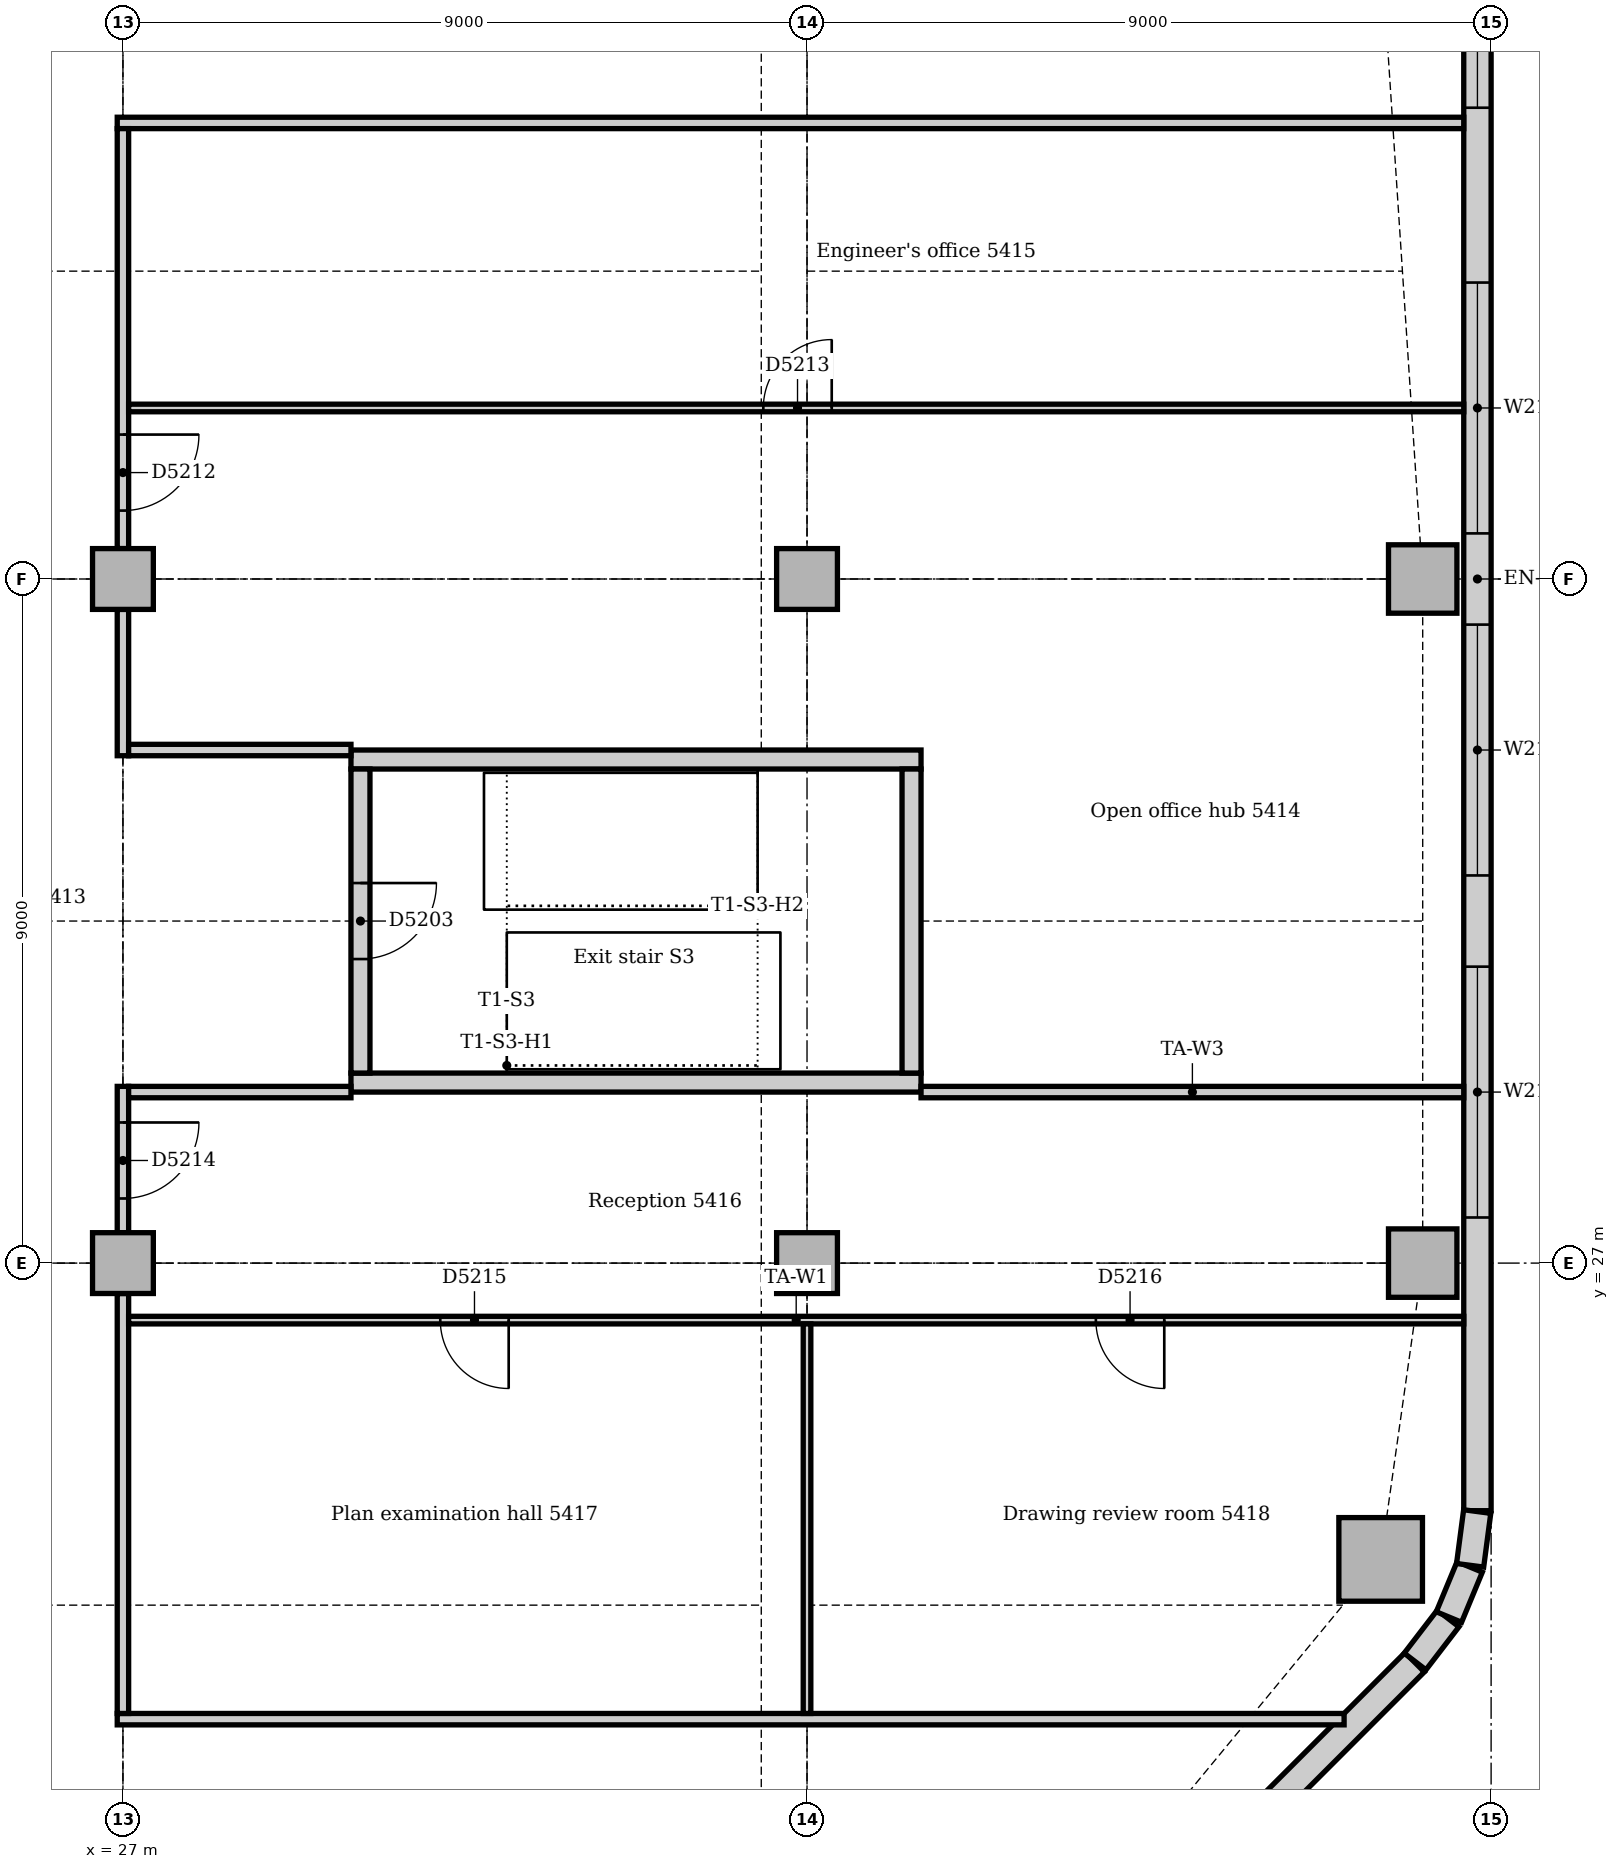
"""IFC4 building model, lengths in metres.
Left out: names, types, materials, properties, quantities, classifications, styles, units other than length and angle.
Written with IfcOpenShell. Run it as: python <this file> out.ifc"""

import sys

from ifc_helpers import new_model, si_unit, direction, frame, frame_2d, origin, origin_2d, place, context, subcontext, project, spatial, rectangle, extrude, element, fill, save


model = new_model("IFC4")
c1 = context("Model", 3, precision=1e-05, world=origin(), true_north=direction((0.0, 1.0)))
c2 = subcontext(c1, "Body", "Model", "MODEL_VIEW")
j1 = project(units=[si_unit("LENGTHUNIT", "METRE"), si_unit("PLANEANGLEUNIT", "RADIAN")], contexts=[c1])
p1 = place(None, origin())
s1 = spatial("IfcSite", under=j1, at=p1, CompositionType="ELEMENT")
p2 = place(p1, origin())
s2 = spatial("IfcBuilding", under=s1, at=p2, CompositionType="ELEMENT")
p3 = place(p2, frame((0.0, 0.0, 226.0)))
s3 = spatial("IfcBuildingStorey", under=s2, at=p3, CompositionType="ELEMENT", Elevation=226.0)
for number, where, z_axis, x_axis in (
    (1, (30.0, 29.375, 0.0), (0.0, 0.0, 1.0), (1.0, 0.0, 0.0)),
    (2, (37.5, 33.625, 0.0), (0.0, 0.0, 1.0), (-1.0, 0.0, 0.0)),
):
    element("IfcWall", number, at=place(p3, frame(where, z_axis=z_axis, x_axis=x_axis)), inside=s3, PredefinedType="SOLIDWALL", context=c2, shape_type="SweptSolid", body=[
        extrude(rectangle(XDim=7.5, YDim=0.25, at=frame_2d((3.75, 0.0))), origin(), (0.0, 0.0, 1.0), 4.0),
    ])
p4 = place(p3, frame((37.375, 29.5, 0.0), z_axis=(0.0, 0.0, 1.0), x_axis=(0.0, 1.0, 0.0)))
e3 = element("IfcWall", 3, at=p4, inside=s3, PredefinedType="SOLIDWALL", context=c2, shape_type="SweptSolid", body=[
    extrude(rectangle(XDim=4.0, YDim=0.25, at=frame_2d((2.0, 0.0))), origin(), (0.0, 0.0, 1.0), 4.0),
])
p5 = place(p3, frame((30.125, 33.5, 0.0), z_axis=(0.0, 0.0, 1.0), x_axis=(0.0, -1.0, 0.0)))
e4 = element("IfcWall", 4, at=p5, inside=s3, PredefinedType="SOLIDWALL", context=c2, shape_type="SweptSolid", body=[
    extrude(rectangle(XDim=4.0, YDim=0.25, at=frame_2d((2.0, 0.0))), origin(), (0.0, 0.0, 1.0), 4.0),
])
p6 = place(p5, frame((1.5, 0.0, 0.0)))
e5 = element("IfcOpeningElement", 5, at=p6, cuts=e4, PredefinedType="OPENING", context=c2, shape_type="SweptSolid", body=[
    extrude(rectangle(XDim=1.0, YDim=2.1, at=frame_2d((0.5, 1.05))), frame((0.0, 0.135, 0.0), z_axis=(0.0, -1.0, 0.0), x_axis=(1.0, 0.0, 0.0)), (0.0, 0.0, 1.0), 0.27),
])
p7 = place(p3, frame((43.547, 23.102, 0.0), z_axis=(0.0, 0.0, 1.0), x_axis=(1.0, 0.0, 0.0)))
e6 = element("IfcColumn", 6, at=p7, inside=s3, PredefinedType="COLUMN", context=c2, shape_type="SweptSolid", body=[
    extrude(rectangle(XDim=1.1, YDim=1.1, at=origin_2d()), origin(), (0.0, 0.0, 1.0), 3.85),
])
for number, where, z_axis, x_axis in (
    (7, (44.1, 27.0, 0.0), (0.0, 0.0, 1.0), (1.0, 0.0, 0.0)),
    (8, (44.1, 36.0, 0.0), (0.0, 0.0, 1.0), (1.0, 0.0, 0.0)),
):
    element("IfcColumn", number, at=place(p3, frame(where, z_axis=z_axis, x_axis=x_axis)), inside=s3, PredefinedType="COLUMN", context=c2, shape_type="SweptSolid", body=[
        extrude(rectangle(XDim=0.9, YDim=0.9, at=origin_2d()), origin(), (0.0, 0.0, 1.0), 3.85),
    ])
for number, where, z_axis, x_axis in (
    (9, (27.0, 27.0, 0.0), (0.0, 0.0, 1.0), (1.0, 0.0, 0.0)),
    (10, (27.0, 36.0, 0.0), (0.0, 0.0, 1.0), (1.0, 0.0, 0.0)),
    (11, (36.0, 27.0, 0.0), (0.0, 0.0, 1.0), (1.0, 0.0, 0.0)),
    (12, (36.0, 36.0, 0.0), (0.0, 0.0, 1.0), (1.0, 0.0, 0.0)),
):
    element("IfcColumn", number, at=place(p3, frame(where, z_axis=z_axis, x_axis=x_axis)), inside=s3, PredefinedType="COLUMN", context=c2, shape_type="SweptSolid", body=[
        extrude(rectangle(XDim=0.8, YDim=0.8, at=origin_2d()), origin(), (0.0, 0.0, 1.0), 3.85),
    ])
p8 = place(p3, frame((36.751, 14.506, 0.0), z_axis=(0.0, 0.0, 1.0), x_axis=(0.707106781187, 0.707106781187, 0.0)))
e13 = element("IfcWall", 13, at=p8, inside=s3, PredefinedType="STANDARD", context=c2, shape_type="SweptSolid", body=[
    extrude(rectangle(XDim=10.243, YDim=0.36, at=frame_2d((5.121, 0.0))), origin(), (0.0, 0.0, 1.0), 3.85),
])
p9 = place(p8, frame((5.021, 0.0, 0.9)))
e14 = element("IfcOpeningElement", 14, at=p9, cuts=e13, PredefinedType="OPENING", context=c2, shape_type="SweptSolid", body=[
    extrude(rectangle(XDim=1.8, YDim=1.6, at=frame_2d((0.9, 0.8))), frame((0.0, 0.19, 0.0), z_axis=(0.0, -1.0, 0.0), x_axis=(1.0, 0.0, 0.0)), (0.0, 0.0, 1.0), 0.38),
])
p10 = place(p3, frame((44.82, 23.743, 0.0), z_axis=(0.0, 0.0, 1.0), x_axis=(0.0, 1.0, 0.0)))
e15 = element("IfcWall", 15, at=p10, inside=s3, PredefinedType="STANDARD", context=c2, shape_type="SweptSolid", body=[
    extrude(rectangle(XDim=24.515, YDim=0.36, at=frame_2d((12.257, 0.0))), origin(), (0.0, 0.0, 1.0), 3.85),
])
p11 = place(p10, frame((3.857, 0.0, 0.9)))
e16 = element("IfcOpeningElement", 16, at=p11, cuts=e15, PredefinedType="OPENING", context=c2, shape_type="SweptSolid", body=[
    extrude(rectangle(XDim=3.3, YDim=1.6, at=frame_2d((1.65, 0.8))), frame((0.0, 0.19, 0.0), z_axis=(0.0, -1.0, 0.0), x_axis=(1.0, 0.0, 0.0)), (0.0, 0.0, 1.0), 0.38),
])
p12 = place(p10, frame((8.357, 0.0, 0.9)))
e17 = element("IfcOpeningElement", 17, at=p12, cuts=e15, PredefinedType="OPENING", context=c2, shape_type="SweptSolid", body=[
    extrude(rectangle(XDim=3.3, YDim=1.6, at=frame_2d((1.65, 0.8))), frame((0.0, 0.19, 0.0), z_axis=(0.0, -1.0, 0.0), x_axis=(1.0, 0.0, 0.0)), (0.0, 0.0, 1.0), 0.38),
])
p13 = place(p10, frame((12.857, 0.0, 0.9)))
e18 = element("IfcOpeningElement", 18, at=p13, cuts=e15, PredefinedType="OPENING", context=c2, shape_type="SweptSolid", body=[
    extrude(rectangle(XDim=3.3, YDim=1.6, at=frame_2d((1.65, 0.8))), frame((0.0, 0.19, 0.0), z_axis=(0.0, -1.0, 0.0), x_axis=(1.0, 0.0, 0.0)), (0.0, 0.0, 1.0), 0.38),
])
p14 = place(p10, frame((18.457, 0.0, 0.9)))
e19 = element("IfcOpeningElement", 19, at=p14, cuts=e15, PredefinedType="OPENING", context=c2, shape_type="SweptSolid", body=[
    extrude(rectangle(XDim=1.8, YDim=1.6, at=frame_2d((0.9, 0.8))), frame((0.0, 0.19, 0.0), z_axis=(0.0, -1.0, 0.0), x_axis=(1.0, 0.0, 0.0)), (0.0, 0.0, 1.0), 0.38),
])
p15 = place(p3, frame((44.0, 21.759, 0.0), z_axis=(0.0, 0.0, 1.0), x_axis=(0.608802368033, 0.793321924995, 0.0)))
e20 = element("IfcWall", 20, at=p15, inside=s3, PredefinedType="STANDARD", context=c2, shape_type="SweptSolid", body=[
    extrude(rectangle(XDim=0.713, YDim=0.36, at=frame_2d((0.357, 0.0))), origin(), (0.0, 0.0, 1.0), 3.85),
])
for number, where, z_axis, x_axis in (
    (21, (44.445, 22.344, 0.0), (0.0, 0.0, 1.0), (0.383, 0.924, 0.0)),
    (22, (44.724, 23.024, 0.0), (0.0, 0.0, 1.0), (0.131, 0.991, 0.0)),
):
    element("IfcWall", number, at=place(p3, frame(where, z_axis=z_axis, x_axis=x_axis)), inside=s3, PredefinedType="STANDARD", context=c2, shape_type="SweptSolid", body=[
        extrude(rectangle(XDim=0.713, YDim=0.36, at=frame_2d((0.356, 0.0))), origin(), (0.0, 0.0, 1.0), 3.85),
    ])
p16 = place(p3, frame((26.925, 42.0, 0.0), z_axis=(0.0, 0.0, 1.0), x_axis=(1.0, 0.0, 0.0)))
e23 = element("IfcWall", 23, at=p16, inside=s3, PredefinedType="PARTITIONING", context=c2, shape_type="SweptSolid", body=[
    extrude(rectangle(XDim=17.715, YDim=0.15, at=frame_2d((8.857, 0.0))), origin(), (0.0, 0.0, 1.0), 3.85),
])
p17 = place(p3, frame((26.925, 21.0, 0.0), z_axis=(0.0, 0.0, 1.0), x_axis=(1.0, 0.0, 0.0)))
e24 = element("IfcWall", 24, at=p17, inside=s3, PredefinedType="PARTITIONING", context=c2, shape_type="SweptSolid", body=[
    extrude(rectangle(XDim=16.141, YDim=0.15, at=frame_2d((8.07, 0.0))), origin(), (0.0, 0.0, 1.0), 3.85),
])
p18 = place(p3, frame((27.0, 21.075, 0.0), z_axis=(0.0, 0.0, 1.0), x_axis=(0.0, 1.0, 0.0)))
e25 = element("IfcWall", 25, at=p18, inside=s3, PredefinedType="PARTITIONING", context=c2, shape_type="SweptSolid", body=[
    extrude(rectangle(XDim=5.525, YDim=0.15, at=frame_2d((2.763, 0.0))), origin(), (0.0, 0.0, 1.0), 3.35),
])
p19 = place(p3, frame((27.0, 27.4, 0.0), z_axis=(0.0, 0.0, 1.0), x_axis=(0.0, 1.0, 0.0)))
e26 = element("IfcWall", 26, at=p19, inside=s3, PredefinedType="PARTITIONING", context=c2, shape_type="SweptSolid", body=[
    extrude(rectangle(XDim=1.925, YDim=0.15, at=frame_2d((0.963, 0.0))), origin(), (0.0, 0.0, 1.0), 3.35),
])
p20 = place(p19, frame((0.45, 0.0, 0.0)))
e27 = element("IfcOpeningElement", 27, at=p20, cuts=e26, PredefinedType="OPENING", context=c2, shape_type="SweptSolid", body=[
    extrude(rectangle(XDim=1.0, YDim=2.1, at=frame_2d((0.5, 1.05))), frame((0.0, 0.085, 0.0), z_axis=(0.0, -1.0, 0.0), x_axis=(1.0, 0.0, 0.0)), (0.0, 0.0, 1.0), 0.17),
])
p21 = place(p3, frame((27.0, 33.675, 0.0), z_axis=(0.0, 0.0, 1.0), x_axis=(0.0, 1.0, 0.0)))
e28 = element("IfcWall", 28, at=p21, inside=s3, PredefinedType="PARTITIONING", context=c2, shape_type="SweptSolid", body=[
    extrude(rectangle(XDim=1.925, YDim=0.15, at=frame_2d((0.963, 0.0))), origin(), (0.0, 0.0, 1.0), 3.35),
])
p22 = place(p3, frame((27.0, 36.4, 0.0), z_axis=(0.0, 0.0, 1.0), x_axis=(0.0, 1.0, 0.0)))
e29 = element("IfcWall", 29, at=p22, inside=s3, PredefinedType="PARTITIONING", context=c2, shape_type="SweptSolid", body=[
    extrude(rectangle(XDim=5.525, YDim=0.15, at=frame_2d((2.763, 0.0))), origin(), (0.0, 0.0, 1.0), 3.35),
])
p23 = place(p22, frame((0.5, 0.0, 0.0)))
e30 = element("IfcOpeningElement", 30, at=p23, cuts=e29, PredefinedType="OPENING", context=c2, shape_type="SweptSolid", body=[
    extrude(rectangle(XDim=1.0, YDim=2.1, at=frame_2d((0.5, 1.05))), frame((0.0, 0.085, 0.0), z_axis=(0.0, -1.0, 0.0), x_axis=(1.0, 0.0, 0.0)), (0.0, 0.0, 1.0), 0.17),
])
for number, where, z_axis, x_axis in (
    (31, (27.075, 29.25, 0.0), (0.0, 0.0, 1.0), (1.0, 0.0, 0.0)),
    (32, (27.075, 33.75, 0.0), (0.0, 0.0, 1.0), (1.0, 0.0, 0.0)),
):
    element("IfcWall", number, at=place(p3, frame(where, z_axis=z_axis, x_axis=x_axis)), inside=s3, PredefinedType="PARTITIONING", context=c2, shape_type="SweptSolid", body=[
        extrude(rectangle(XDim=2.925, YDim=0.15, at=frame_2d((1.462, 0.0))), origin(), (0.0, 0.0, 1.0), 3.85),
    ])
p24 = place(p3, frame((37.5, 29.25, 0.0), z_axis=(0.0, 0.0, 1.0), x_axis=(1.0, 0.0, 0.0)))
e33 = element("IfcWall", 33, at=p24, inside=s3, PredefinedType="PARTITIONING", context=c2, shape_type="SweptSolid", body=[
    extrude(rectangle(XDim=7.14, YDim=0.15, at=frame_2d((3.57, 0.0))), origin(), (0.0, 0.0, 1.0), 3.85),
])
p25 = place(p3, frame((27.075, 26.25, 0.0), z_axis=(0.0, 0.0, 1.0), x_axis=(1.0, 0.0, 0.0)))
e34 = element("IfcWall", 34, at=p25, inside=s3, PredefinedType="PARTITIONING", context=c2, shape_type="SweptSolid", body=[
    extrude(rectangle(XDim=17.565, YDim=0.1, at=frame_2d((8.783, 0.0))), origin(), (0.0, 0.0, 1.0), 3.85),
])
p26 = place(p25, frame((4.1, 0.0, 0.0)))
e35 = element("IfcOpeningElement", 35, at=p26, cuts=e34, PredefinedType="OPENING", context=c2, shape_type="SweptSolid", body=[
    extrude(rectangle(XDim=0.9, YDim=2.1, at=frame_2d((0.45, 1.05))), frame((0.0, 0.06, 0.0), z_axis=(0.0, -1.0, 0.0), x_axis=(1.0, 0.0, 0.0)), (0.0, 0.0, 1.0), 0.12),
])
p27 = place(p25, frame((12.725, 0.0, 0.0)))
e36 = element("IfcOpeningElement", 36, at=p27, cuts=e34, PredefinedType="OPENING", context=c2, shape_type="SweptSolid", body=[
    extrude(rectangle(XDim=0.9, YDim=2.1, at=frame_2d((0.45, 1.05))), frame((0.0, 0.06, 0.0), z_axis=(0.0, -1.0, 0.0), x_axis=(1.0, 0.0, 0.0)), (0.0, 0.0, 1.0), 0.12),
])
p28 = place(p3, frame((27.075, 38.25, 0.0), z_axis=(0.0, 0.0, 1.0), x_axis=(1.0, 0.0, 0.0)))
e37 = element("IfcWall", 37, at=p28, inside=s3, PredefinedType="PARTITIONING", context=c2, shape_type="SweptSolid", body=[
    extrude(rectangle(XDim=17.565, YDim=0.1, at=frame_2d((8.783, 0.0))), origin(), (0.0, 0.0, 1.0), 3.85),
])
p29 = place(p28, frame((8.35, 0.0, 0.0)))
e38 = element("IfcOpeningElement", 38, at=p29, cuts=e37, PredefinedType="OPENING", context=c2, shape_type="SweptSolid", body=[
    extrude(rectangle(XDim=0.9, YDim=2.1, at=frame_2d((0.45, 1.05))), frame((0.0, 0.06, 0.0), z_axis=(0.0, -1.0, 0.0), x_axis=(1.0, 0.0, 0.0)), (0.0, 0.0, 1.0), 0.12),
])
p30 = place(p3, frame((36.0, 21.075, 0.0), z_axis=(0.0, 0.0, 1.0), x_axis=(0.0, 1.0, 0.0)))
e39 = element("IfcWall", 39, at=p30, inside=s3, PredefinedType="PARTITIONING", context=c2, shape_type="SweptSolid", body=[
    extrude(rectangle(XDim=5.125, YDim=0.1, at=frame_2d((2.562, 0.0))), origin(), (0.0, 0.0, 1.0), 3.35),
])
p31 = place(p11, origin())
e40 = element("IfcWindow", 40, at=p31, inside=s3, PartitioningType="SINGLE_PANEL", PredefinedType="WINDOW", context=c2, shape_type="SweptSolid", body=[
    extrude(rectangle(XDim=3.3, YDim=1.6, at=frame_2d((1.65, 0.8))), frame((0.0, 0.13, 0.0), z_axis=(0.0, -1.0, 0.0), x_axis=(1.0, 0.0, 0.0)), (0.0, 0.0, 1.0), 0.06),
])
fill(e16, e40)
p32 = place(p12, origin())
e41 = element("IfcWindow", 41, at=p32, inside=s3, PartitioningType="SINGLE_PANEL", PredefinedType="WINDOW", context=c2, shape_type="SweptSolid", body=[
    extrude(rectangle(XDim=3.3, YDim=1.6, at=frame_2d((1.65, 0.8))), frame((0.0, 0.13, 0.0), z_axis=(0.0, -1.0, 0.0), x_axis=(1.0, 0.0, 0.0)), (0.0, 0.0, 1.0), 0.06),
])
fill(e17, e41)
p33 = place(p13, origin())
e42 = element("IfcWindow", 42, at=p33, inside=s3, PartitioningType="SINGLE_PANEL", PredefinedType="WINDOW", context=c2, shape_type="SweptSolid", body=[
    extrude(rectangle(XDim=3.3, YDim=1.6, at=frame_2d((1.65, 0.8))), frame((0.0, 0.13, 0.0), z_axis=(0.0, -1.0, 0.0), x_axis=(1.0, 0.0, 0.0)), (0.0, 0.0, 1.0), 0.06),
])
fill(e18, e42)
p34 = place(p14, origin())
e43 = element("IfcWindow", 43, at=p34, inside=s3, PartitioningType="SINGLE_PANEL", PredefinedType="WINDOW", context=c2, shape_type="SweptSolid", body=[
    extrude(rectangle(XDim=1.8, YDim=1.6, at=frame_2d((0.9, 0.8))), frame((0.0, 0.13, 0.0), z_axis=(0.0, -1.0, 0.0), x_axis=(1.0, 0.0, 0.0)), (0.0, 0.0, 1.0), 0.06),
])
fill(e19, e43)
p35 = place(p6, origin())
e44 = element("IfcDoor", 44, at=p35, inside=s3, OperationType="SINGLE_SWING_LEFT", PredefinedType="DOOR", context=c2, shape_type="SweptSolid", body=[
    extrude(rectangle(XDim=1.0, YDim=2.1, at=frame_2d((0.5, 1.05))), frame((0.0, 0.025, 0.0), z_axis=(0.0, -1.0, 0.0), x_axis=(1.0, 0.0, 0.0)), (0.0, 0.0, 1.0), 0.05),
])
fill(e5, e44)
p36 = place(p23, frame((1.0, 0.0, 0.0), z_axis=(0.0, 0.0, 1.0), x_axis=(-1.0, 0.0, 0.0)))
e45 = element("IfcDoor", 45, at=p36, inside=s3, OperationType="SINGLE_SWING_LEFT", PredefinedType="DOOR", context=c2, shape_type="SweptSolid", body=[
    extrude(rectangle(XDim=1.0, YDim=2.1, at=frame_2d((0.5, 1.05))), frame((0.0, 0.025, 0.0), z_axis=(0.0, -1.0, 0.0), x_axis=(1.0, 0.0, 0.0)), (0.0, 0.0, 1.0), 0.05),
])
fill(e30, e45)
p37 = place(p29, origin())
e46 = element("IfcDoor", 46, at=p37, inside=s3, OperationType="SINGLE_SWING_RIGHT", PredefinedType="DOOR", context=c2, shape_type="SweptSolid", body=[
    extrude(rectangle(XDim=0.9, YDim=2.1, at=frame_2d((0.45, 1.05))), frame((0.0, 0.025, 0.0), z_axis=(0.0, -1.0, 0.0), x_axis=(1.0, 0.0, 0.0)), (0.0, 0.0, 1.0), 0.05),
])
fill(e38, e46)
p38 = place(p20, frame((1.0, 0.0, 0.0), z_axis=(0.0, 0.0, 1.0), x_axis=(-1.0, 0.0, 0.0)))
e47 = element("IfcDoor", 47, at=p38, inside=s3, OperationType="SINGLE_SWING_LEFT", PredefinedType="DOOR", context=c2, shape_type="SweptSolid", body=[
    extrude(rectangle(XDim=1.0, YDim=2.1, at=frame_2d((0.5, 1.05))), frame((0.0, 0.025, 0.0), z_axis=(0.0, -1.0, 0.0), x_axis=(1.0, 0.0, 0.0)), (0.0, 0.0, 1.0), 0.05),
])
fill(e27, e47)
p39 = place(p26, frame((0.9, 0.0, 0.0), z_axis=(0.0, 0.0, 1.0), x_axis=(-1.0, 0.0, 0.0)))
e48 = element("IfcDoor", 48, at=p39, inside=s3, OperationType="SINGLE_SWING_LEFT", PredefinedType="DOOR", context=c2, shape_type="SweptSolid", body=[
    extrude(rectangle(XDim=0.9, YDim=2.1, at=frame_2d((0.45, 1.05))), frame((0.0, 0.025, 0.0), z_axis=(0.0, -1.0, 0.0), x_axis=(1.0, 0.0, 0.0)), (0.0, 0.0, 1.0), 0.05),
])
fill(e35, e48)
p40 = place(p27, frame((0.9, 0.0, 0.0), z_axis=(0.0, 0.0, 1.0), x_axis=(-1.0, 0.0, 0.0)))
e49 = element("IfcDoor", 49, at=p40, inside=s3, OperationType="SINGLE_SWING_LEFT", PredefinedType="DOOR", context=c2, shape_type="SweptSolid", body=[
    extrude(rectangle(XDim=0.9, YDim=2.1, at=frame_2d((0.45, 1.05))), frame((0.0, 0.025, 0.0), z_axis=(0.0, -1.0, 0.0), x_axis=(1.0, 0.0, 0.0)), (0.0, 0.0, 1.0), 0.05),
])
fill(e36, e49)
save(model, sys.argv[1])
